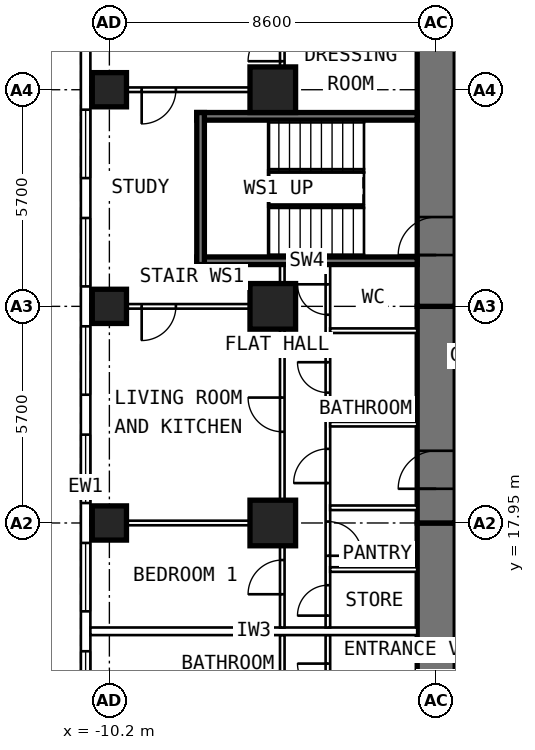
"""IFC4 building model, lengths in metres.
Left out: names, types, materials, properties, quantities, classifications, styles, units other than length and angle.
Written with IfcOpenShell. Run it as: python <this file> out.ifc"""

import sys

from ifc_helpers import new_model, si_unit, direction, frame, frame_2d, origin, origin_2d, place, context, subcontext, project, spatial, rectangle, extrude, element, fill, save


model = new_model("IFC4")
c1 = context("Model", 3, precision=1e-05, world=origin(), true_north=direction((0.0, 1.0)))
c2 = subcontext(c1, "Body", "Model", "MODEL_VIEW")
j1 = project(units=[si_unit("LENGTHUNIT", "METRE"), si_unit("PLANEANGLEUNIT", "RADIAN")], contexts=[c1])
p1 = place(None, origin())
s1 = spatial("IfcSite", under=j1, at=p1, CompositionType="ELEMENT")
p2 = place(p1, origin())
s2 = spatial("IfcBuilding", under=s1, at=p2, CompositionType="ELEMENT")
p3 = place(p2, frame((0.0, 0.0, 106.0)))
s3 = spatial("IfcBuildingStorey", under=s2, at=p3, CompositionType="ELEMENT", Elevation=106.0)
for number, where, z_axis, x_axis in (
    (1, (-10.2, 17.95, 0.0), (0.0, 0.0, 1.0), (0.0, 1.0, 0.0)),
    (2, (-10.2, 23.65, 0.0), (0.0, 0.0, 1.0), (0.0, 1.0, 0.0)),
    (3, (-10.2, 29.35, 0.0), (0.0, 0.0, 1.0), (0.0, 1.0, 0.0)),
):
    element("IfcColumn", number, at=place(p3, frame(where, z_axis=z_axis, x_axis=x_axis)), inside=s3, PredefinedType="COLUMN", context=c2, shape_type="SweptSolid", body=[
        extrude(rectangle(XDim=0.9, YDim=0.9, at=origin_2d()), origin(), (0.0, 0.0, 1.0), 3.6),
    ])
for number, where, z_axis, x_axis in (
    (4, (-5.9, 17.95, 0.0), (0.0, 0.0, 1.0), (0.0, 1.0, 0.0)),
    (5, (-5.9, 23.65, 0.0), (0.0, 0.0, 1.0), (0.0, 1.0, 0.0)),
    (6, (-5.9, 29.35, 0.0), (0.0, 0.0, 1.0), (0.0, 1.0, 0.0)),
):
    element("IfcColumn", number, at=place(p3, frame(where, z_axis=z_axis, x_axis=x_axis)), inside=s3, PredefinedType="COLUMN", context=c2, shape_type="SweptSolid", body=[
        extrude(rectangle(XDim=1.2, YDim=1.2, at=origin_2d()), origin(), (0.0, 0.0, 1.0), 3.6),
    ])
p4 = place(p3, frame((-1.6, 9.6, 0.0), z_axis=(0.0, 0.0, 1.0), x_axis=(0.0, 1.0, 0.0)))
e7 = element("IfcWall", 7, at=p4, inside=s3, PredefinedType="SHEAR", context=c2, shape_type="SweptSolid", body=[
    extrude(rectangle(XDim=8.35, YDim=1.0, at=frame_2d((4.175, 0.0))), origin(), (0.0, 0.0, 1.0), 3.6),
])
p5 = place(p4, frame((1.3, 0.0, 0.0)))
e8 = element("IfcOpeningElement", 8, at=p5, cuts=e7, PredefinedType="OPENING", context=c2, shape_type="SweptSolid", body=[
    extrude(rectangle(XDim=1.0, YDim=2.1, at=frame_2d((0.5, 1.05))), frame((0.0, 0.512, 0.0), z_axis=(0.0, -1.0, 0.0), x_axis=(1.0, 0.0, 0.0)), (0.0, 0.0, 1.0), 1.024),
])
p6 = place(p3, frame((-1.6, 17.95, 0.0), z_axis=(0.0, 0.0, 1.0), x_axis=(0.0, 1.0, 0.0)))
e9 = element("IfcWall", 9, at=p6, inside=s3, PredefinedType="SHEAR", context=c2, shape_type="SweptSolid", body=[
    extrude(rectangle(XDim=5.7, YDim=1.0, at=frame_2d((2.85, 0.0))), origin(), (0.0, 0.0, 1.0), 3.6),
])
p7 = place(p6, frame((0.9, 0.0, 0.0)))
e10 = element("IfcOpeningElement", 10, at=p7, cuts=e9, PredefinedType="OPENING", context=c2, shape_type="SweptSolid", body=[
    extrude(rectangle(XDim=1.0, YDim=2.1, at=frame_2d((0.5, 1.05))), frame((0.0, 0.512, 0.0), z_axis=(0.0, -1.0, 0.0), x_axis=(1.0, 0.0, 0.0)), (0.0, 0.0, 1.0), 1.024),
])
p8 = place(p3, frame((-1.6, 23.65, 0.0), z_axis=(0.0, 0.0, 1.0), x_axis=(0.0, 1.0, 0.0)))
e11 = element("IfcWall", 11, at=p8, inside=s3, PredefinedType="SHEAR", context=c2, shape_type="SweptSolid", body=[
    extrude(rectangle(XDim=10.745, YDim=1.0, at=frame_2d((5.373, 0.0))), origin(), (0.0, 0.0, 1.0), 3.6),
])
p9 = place(p8, frame((1.35, 0.0, 0.0)))
e12 = element("IfcOpeningElement", 12, at=p9, cuts=e11, PredefinedType="OPENING", context=c2, shape_type="SweptSolid", body=[
    extrude(rectangle(XDim=1.0, YDim=2.1, at=frame_2d((0.5, 1.05))), frame((0.0, 0.512, 0.0), z_axis=(0.0, -1.0, 0.0), x_axis=(1.0, 0.0, 0.0)), (0.0, 0.0, 1.0), 1.024),
])
p10 = place(p3, frame((-10.825, 6.148, 0.0), z_axis=(0.0, 0.0, 1.0), x_axis=(0.0, 1.0, 0.0)))
e13 = element("IfcWall", 13, at=p10, inside=s3, PredefinedType="SOLIDWALL", context=c2, shape_type="SweptSolid", body=[
    extrude(rectangle(XDim=25.487, YDim=0.25, at=frame_2d((12.744, 0.0))), origin(), (0.0, 0.0, 1.0), 3.35),
])
p11 = place(p10, frame((0.927, 0.0, 0.8)))
e14 = element("IfcOpeningElement", 14, at=p11, cuts=e13, PredefinedType="OPENING", context=c2, shape_type="SweptSolid", body=[
    extrude(rectangle(XDim=1.8, YDim=1.8, at=frame_2d((0.9, 0.9))), frame((0.0, 0.137, 0.0), z_axis=(0.0, -1.0, 0.0), x_axis=(1.0, 0.0, 0.0)), (0.0, 0.0, 1.0), 0.274),
])
p12 = place(p10, frame((3.777, 0.0, 0.8)))
e15 = element("IfcOpeningElement", 15, at=p12, cuts=e13, PredefinedType="OPENING", context=c2, shape_type="SweptSolid", body=[
    extrude(rectangle(XDim=1.8, YDim=1.8, at=frame_2d((0.9, 0.9))), frame((0.0, 0.137, 0.0), z_axis=(0.0, -1.0, 0.0), x_axis=(1.0, 0.0, 0.0)), (0.0, 0.0, 1.0), 0.274),
])
p13 = place(p10, frame((6.627, 0.0, 0.8)))
e16 = element("IfcOpeningElement", 16, at=p13, cuts=e13, PredefinedType="OPENING", context=c2, shape_type="SweptSolid", body=[
    extrude(rectangle(XDim=1.8, YDim=1.8, at=frame_2d((0.9, 0.9))), frame((0.0, 0.137, 0.0), z_axis=(0.0, -1.0, 0.0), x_axis=(1.0, 0.0, 0.0)), (0.0, 0.0, 1.0), 0.274),
])
p14 = place(p10, frame((9.477, 0.0, 0.8)))
e17 = element("IfcOpeningElement", 17, at=p14, cuts=e13, PredefinedType="OPENING", context=c2, shape_type="SweptSolid", body=[
    extrude(rectangle(XDim=1.8, YDim=1.8, at=frame_2d((0.9, 0.9))), frame((0.0, 0.137, 0.0), z_axis=(0.0, -1.0, 0.0), x_axis=(1.0, 0.0, 0.0)), (0.0, 0.0, 1.0), 0.274),
])
p15 = place(p10, frame((12.327, 0.0, 0.8)))
e18 = element("IfcOpeningElement", 18, at=p15, cuts=e13, PredefinedType="OPENING", context=c2, shape_type="SweptSolid", body=[
    extrude(rectangle(XDim=1.8, YDim=1.8, at=frame_2d((0.9, 0.9))), frame((0.0, 0.137, 0.0), z_axis=(0.0, -1.0, 0.0), x_axis=(1.0, 0.0, 0.0)), (0.0, 0.0, 1.0), 0.274),
])
p16 = place(p10, frame((15.177, 0.0, 0.8)))
e19 = element("IfcOpeningElement", 19, at=p16, cuts=e13, PredefinedType="OPENING", context=c2, shape_type="SweptSolid", body=[
    extrude(rectangle(XDim=1.8, YDim=1.8, at=frame_2d((0.9, 0.9))), frame((0.0, 0.137, 0.0), z_axis=(0.0, -1.0, 0.0), x_axis=(1.0, 0.0, 0.0)), (0.0, 0.0, 1.0), 0.274),
])
p17 = place(p10, frame((18.027, 0.0, 0.8)))
e20 = element("IfcOpeningElement", 20, at=p17, cuts=e13, PredefinedType="OPENING", context=c2, shape_type="SweptSolid", body=[
    extrude(rectangle(XDim=1.8, YDim=1.8, at=frame_2d((0.9, 0.9))), frame((0.0, 0.137, 0.0), z_axis=(0.0, -1.0, 0.0), x_axis=(1.0, 0.0, 0.0)), (0.0, 0.0, 1.0), 0.274),
])
p18 = place(p10, frame((20.877, 0.0, 0.8)))
e21 = element("IfcOpeningElement", 21, at=p18, cuts=e13, PredefinedType="OPENING", context=c2, shape_type="SweptSolid", body=[
    extrude(rectangle(XDim=1.8, YDim=1.8, at=frame_2d((0.9, 0.9))), frame((0.0, 0.137, 0.0), z_axis=(0.0, -1.0, 0.0), x_axis=(1.0, 0.0, 0.0)), (0.0, 0.0, 1.0), 0.274),
])
p19 = place(p3, frame((-4.45, 10.1, 0.0), z_axis=(0.0, 0.0, 1.0), x_axis=(0.0, 1.0, 0.0)))
e22 = element("IfcWall", 22, at=p19, inside=s3, PredefinedType="PARTITIONING", context=c2, shape_type="SweptSolid", body=[
    extrude(rectangle(XDim=4.9, YDim=0.12, at=frame_2d((2.45, 0.0))), origin(), (0.0, 0.0, 1.0), 3.35),
])
p20 = place(p19, frame((0.75, 0.0, 0.0)))
e23 = element("IfcOpeningElement", 23, at=p20, cuts=e22, PredefinedType="OPENING", context=c2, shape_type="SweptSolid", body=[
    extrude(rectangle(XDim=0.9, YDim=2.1, at=frame_2d((0.45, 1.05))), frame((0.0, 0.072, 0.0), z_axis=(0.0, -1.0, 0.0), x_axis=(1.0, 0.0, 0.0)), (0.0, 0.0, 1.0), 0.144),
])
p21 = place(p19, frame((3.35, 0.0, 0.0)))
e24 = element("IfcOpeningElement", 24, at=p21, cuts=e22, PredefinedType="OPENING", context=c2, shape_type="SweptSolid", body=[
    extrude(rectangle(XDim=0.8, YDim=2.1, at=frame_2d((0.4, 1.05))), frame((0.0, 0.072, 0.0), z_axis=(0.0, -1.0, 0.0), x_axis=(1.0, 0.0, 0.0)), (0.0, 0.0, 1.0), 0.144),
])
p22 = place(p3, frame((-5.65, 9.6, 0.0), z_axis=(0.0, 0.0, 1.0), x_axis=(0.0, 1.0, 0.0)))
e25 = element("IfcWall", 25, at=p22, inside=s3, PredefinedType="PARTITIONING", context=c2, shape_type="SweptSolid", body=[
    extrude(rectangle(XDim=5.4, YDim=0.12, at=frame_2d((2.7, 0.0))), origin(), (0.0, 0.0, 1.0), 3.35),
])
p23 = place(p22, frame((3.4, 0.0, 0.0)))
e26 = element("IfcOpeningElement", 26, at=p23, cuts=e25, PredefinedType="OPENING", context=c2, shape_type="SweptSolid", body=[
    extrude(rectangle(XDim=0.9, YDim=2.1, at=frame_2d((0.45, 1.05))), frame((0.0, 0.072, 0.0), z_axis=(0.0, -1.0, 0.0), x_axis=(1.0, 0.0, 0.0)), (0.0, 0.0, 1.0), 0.144),
])
p24 = place(p3, frame((-4.45, 15.2, 0.0), z_axis=(0.0, 0.0, 1.0), x_axis=(0.0, 1.0, 0.0)))
e27 = element("IfcWall", 27, at=p24, inside=s3, PredefinedType="PARTITIONING", context=c2, shape_type="SweptSolid", body=[
    extrude(rectangle(XDim=9.55, YDim=0.12, at=frame_2d((4.775, 0.0))), origin(), (0.0, 0.0, 1.0), 3.35),
])
p25 = place(p24, frame((0.312, 0.0, 0.0)))
e28 = element("IfcOpeningElement", 28, at=p25, cuts=e27, PredefinedType="OPENING", context=c2, shape_type="SweptSolid", body=[
    extrude(rectangle(XDim=0.8, YDim=2.1, at=frame_2d((0.4, 1.05))), frame((0.0, 0.072, 0.0), z_axis=(0.0, -1.0, 0.0), x_axis=(1.0, 0.0, 0.0)), (0.0, 0.0, 1.0), 0.144),
])
p26 = place(p24, frame((1.887, 0.0, 0.0)))
e29 = element("IfcOpeningElement", 29, at=p26, cuts=e27, PredefinedType="OPENING", context=c2, shape_type="SweptSolid", body=[
    extrude(rectangle(XDim=0.9, YDim=2.1, at=frame_2d((0.45, 1.05))), frame((0.0, 0.072, 0.0), z_axis=(0.0, -1.0, 0.0), x_axis=(1.0, 0.0, 0.0)), (0.0, 0.0, 1.0), 0.144),
])
p27 = place(p24, frame((3.8, 0.0, 0.0)))
e30 = element("IfcOpeningElement", 30, at=p27, cuts=e27, PredefinedType="OPENING", context=c2, shape_type="SweptSolid", body=[
    extrude(rectangle(XDim=0.9, YDim=2.1, at=frame_2d((0.45, 1.05))), frame((0.0, 0.072, 0.0), z_axis=(0.0, -1.0, 0.0), x_axis=(1.0, 0.0, 0.0)), (0.0, 0.0, 1.0), 0.144),
])
p28 = place(p24, frame((6.18, 0.0, 0.0)))
e31 = element("IfcOpeningElement", 31, at=p28, cuts=e27, PredefinedType="OPENING", context=c2, shape_type="SweptSolid", body=[
    extrude(rectangle(XDim=0.8, YDim=2.1, at=frame_2d((0.4, 1.05))), frame((0.0, 0.072, 0.0), z_axis=(0.0, -1.0, 0.0), x_axis=(1.0, 0.0, 0.0)), (0.0, 0.0, 1.0), 0.144),
])
p29 = place(p24, frame((8.23, 0.0, 0.0)))
e32 = element("IfcOpeningElement", 32, at=p29, cuts=e27, PredefinedType="OPENING", context=c2, shape_type="SweptSolid", body=[
    extrude(rectangle(XDim=0.8, YDim=2.1, at=frame_2d((0.4, 1.05))), frame((0.0, 0.072, 0.0), z_axis=(0.0, -1.0, 0.0), x_axis=(1.0, 0.0, 0.0)), (0.0, 0.0, 1.0), 0.144),
])
p30 = place(p3, frame((-5.65, 15.2, 0.0), z_axis=(0.0, 0.0, 1.0), x_axis=(0.0, 1.0, 0.0)))
e33 = element("IfcWall", 33, at=p30, inside=s3, PredefinedType="PARTITIONING", context=c2, shape_type="SweptSolid", body=[
    extrude(rectangle(XDim=9.55, YDim=0.12, at=frame_2d((4.775, 0.0))), origin(), (0.0, 0.0, 1.0), 3.35),
])
p31 = place(p30, frame((0.875, 0.0, 0.0)))
e34 = element("IfcOpeningElement", 34, at=p31, cuts=e33, PredefinedType="OPENING", context=c2, shape_type="SweptSolid", body=[
    extrude(rectangle(XDim=0.9, YDim=2.1, at=frame_2d((0.45, 1.05))), frame((0.0, 0.072, 0.0), z_axis=(0.0, -1.0, 0.0), x_axis=(1.0, 0.0, 0.0)), (0.0, 0.0, 1.0), 0.144),
])
p32 = place(p30, frame((5.15, 0.0, 0.0)))
e35 = element("IfcOpeningElement", 35, at=p32, cuts=e33, PredefinedType="OPENING", context=c2, shape_type="SweptSolid", body=[
    extrude(rectangle(XDim=0.9, YDim=2.1, at=frame_2d((0.45, 1.05))), frame((0.0, 0.072, 0.0), z_axis=(0.0, -1.0, 0.0), x_axis=(1.0, 0.0, 0.0)), (0.0, 0.0, 1.0), 0.144),
])
p33 = place(p3, frame((-5.71, 17.95, 0.0), z_axis=(0.0, 0.0, 1.0), x_axis=(-1.0, 0.0, 0.0)))
e36 = element("IfcWall", 36, at=p33, inside=s3, PredefinedType="PARTITIONING", context=c2, shape_type="SweptSolid", body=[
    extrude(rectangle(XDim=4.99, YDim=0.12, at=frame_2d((2.495, 0.0))), origin(), (0.0, 0.0, 1.0), 2.45),
])
for number, where, z_axis, x_axis in (
    (37, (-2.1, 16.725, 0.0), (0.0, 0.0, 1.0), (-1.0, 0.0, 0.0)),
    (38, (-2.1, 18.35, 0.0), (0.0, 0.0, 1.0), (-1.0, 0.0, 0.0)),
    (39, (-2.1, 20.55, 0.0), (0.0, 0.0, 1.0), (-1.0, 0.0, 0.0)),
    (40, (-2.1, 23.01, 0.0), (0.0, 0.0, 1.0), (-1.0, 0.0, 0.0)),
):
    element("IfcWall", number, at=place(p3, frame(where, z_axis=z_axis, x_axis=x_axis)), inside=s3, PredefinedType="PARTITIONING", context=c2, shape_type="SweptSolid", body=[
        extrude(rectangle(XDim=2.29, YDim=0.12, at=frame_2d((1.145, 0.0))), origin(), (0.0, 0.0, 1.0), 3.35),
    ])
p34 = place(p3, frame((-2.1, 15.1, 0.0), z_axis=(0.0, 0.0, 1.0), x_axis=(-1.0, 0.0, 0.0)))
e41 = element("IfcWall", 41, at=p34, inside=s3, PredefinedType="PARTITIONING", context=c2, shape_type="SweptSolid", body=[
    extrude(rectangle(XDim=8.6, YDim=0.2, at=frame_2d((4.3, 0.0))), origin(), (0.0, 0.0, 1.0), 3.35),
])
p35 = place(p3, frame((-5.71, 23.65, 0.0), z_axis=(0.0, 0.0, 1.0), x_axis=(-1.0, 0.0, 0.0)))
e42 = element("IfcWall", 42, at=p35, inside=s3, PredefinedType="PARTITIONING", context=c2, shape_type="SweptSolid", body=[
    extrude(rectangle(XDim=4.99, YDim=0.12, at=frame_2d((2.495, 0.0))), origin(), (0.0, 0.0, 1.0), 2.45),
])
p36 = place(p35, frame((2.74, 0.0, 0.0)))
e43 = element("IfcOpeningElement", 43, at=p36, cuts=e42, PredefinedType="OPENING", context=c2, shape_type="SweptSolid", body=[
    extrude(rectangle(XDim=0.9, YDim=2.1, at=frame_2d((0.45, 1.05))), frame((0.0, 0.072, 0.0), z_axis=(0.0, -1.0, 0.0), x_axis=(1.0, 0.0, 0.0)), (0.0, 0.0, 1.0), 0.144),
])
p37 = place(p3, frame((-5.71, 29.35, 0.0), z_axis=(0.0, 0.0, 1.0), x_axis=(-1.0, 0.0, 0.0)))
e44 = element("IfcWall", 44, at=p37, inside=s3, PredefinedType="PARTITIONING", context=c2, shape_type="SweptSolid", body=[
    extrude(rectangle(XDim=4.99, YDim=0.12, at=frame_2d((2.495, 0.0))), origin(), (0.0, 0.0, 1.0), 2.45),
])
p38 = place(p37, frame((2.74, 0.0, 0.0)))
e45 = element("IfcOpeningElement", 45, at=p38, cuts=e44, PredefinedType="OPENING", context=c2, shape_type="SweptSolid", body=[
    extrude(rectangle(XDim=0.9, YDim=2.1, at=frame_2d((0.45, 1.05))), frame((0.0, 0.072, 0.0), z_axis=(0.0, -1.0, 0.0), x_axis=(1.0, 0.0, 0.0)), (0.0, 0.0, 1.0), 0.144),
])
p39 = place(p3, frame((-5.65, 28.95, 0.0), z_axis=(0.0, 0.0, 1.0), x_axis=(0.0, 1.0, 0.0)))
e46 = element("IfcWall", 46, at=p39, inside=s3, PredefinedType="PARTITIONING", context=c2, shape_type="SweptSolid", body=[
    extrude(rectangle(XDim=5.445, YDim=0.12, at=frame_2d((2.723, 0.0))), origin(), (0.0, 0.0, 1.0), 3.35),
])
p40 = place(p39, frame((1.15, 0.0, 0.0)))
e47 = element("IfcOpeningElement", 47, at=p40, cuts=e46, PredefinedType="OPENING", context=c2, shape_type="SweptSolid", body=[
    extrude(rectangle(XDim=0.9, YDim=2.1, at=frame_2d((0.45, 1.05))), frame((0.0, 0.072, 0.0), z_axis=(0.0, -1.0, 0.0), x_axis=(1.0, 0.0, 0.0)), (0.0, 0.0, 1.0), 0.144),
])
for number, where, z_axis, x_axis in (
    (48, (-2.1, 24.85, 0.0), (0.0, 0.0, 1.0), (-1.0, 0.0, 0.0)),
    (49, (-2.1, 28.65, 0.0), (0.0, 0.0, 1.0), (-1.0, 0.0, 0.0)),
):
    element("IfcWall", number, at=place(p3, frame(where, z_axis=z_axis, x_axis=x_axis)), inside=s3, PredefinedType="SHEAR", context=c2, shape_type="SweptSolid", body=[
        extrude(rectangle(XDim=5.8, YDim=0.2, at=frame_2d((2.9, 0.0))), origin(), (0.0, 0.0, 1.0), 3.33),
    ])
p41 = place(p3, frame((-7.8, 24.75, 0.0), z_axis=(0.0, 0.0, 1.0), x_axis=(0.0, 1.0, 0.0)))
e50 = element("IfcWall", 50, at=p41, inside=s3, PredefinedType="SHEAR", context=c2, shape_type="SweptSolid", body=[
    extrude(rectangle(XDim=4.0, YDim=0.2, at=frame_2d((2.0, 0.0))), origin(), (0.0, 0.0, 1.0), 3.33),
])
p42 = place(p13, origin())
e51 = element("IfcWindow", 51, at=p42, inside=s3, PartitioningType="SINGLE_PANEL", PredefinedType="WINDOW", context=c2, shape_type="SweptSolid", body=[
    extrude(rectangle(XDim=1.8, YDim=1.8, at=frame_2d((0.9, 0.9))), frame((0.0, 0.03, 0.0), z_axis=(0.0, -1.0, 0.0), x_axis=(1.0, 0.0, 0.0)), (0.0, 0.0, 1.0), 0.06),
])
fill(e16, e51)
p43 = place(p14, origin())
e52 = element("IfcWindow", 52, at=p43, inside=s3, PartitioningType="SINGLE_PANEL", PredefinedType="WINDOW", context=c2, shape_type="SweptSolid", body=[
    extrude(rectangle(XDim=1.8, YDim=1.8, at=frame_2d((0.9, 0.9))), frame((0.0, 0.03, 0.0), z_axis=(0.0, -1.0, 0.0), x_axis=(1.0, 0.0, 0.0)), (0.0, 0.0, 1.0), 0.06),
])
fill(e17, e52)
p44 = place(p15, origin())
e53 = element("IfcWindow", 53, at=p44, inside=s3, PartitioningType="SINGLE_PANEL", PredefinedType="WINDOW", context=c2, shape_type="SweptSolid", body=[
    extrude(rectangle(XDim=1.8, YDim=1.8, at=frame_2d((0.9, 0.9))), frame((0.0, 0.03, 0.0), z_axis=(0.0, -1.0, 0.0), x_axis=(1.0, 0.0, 0.0)), (0.0, 0.0, 1.0), 0.06),
])
fill(e18, e53)
p45 = place(p16, origin())
e54 = element("IfcWindow", 54, at=p45, inside=s3, PartitioningType="SINGLE_PANEL", PredefinedType="WINDOW", context=c2, shape_type="SweptSolid", body=[
    extrude(rectangle(XDim=1.8, YDim=1.8, at=frame_2d((0.9, 0.9))), frame((0.0, 0.03, 0.0), z_axis=(0.0, -1.0, 0.0), x_axis=(1.0, 0.0, 0.0)), (0.0, 0.0, 1.0), 0.06),
])
fill(e19, e54)
p46 = place(p17, origin())
e55 = element("IfcWindow", 55, at=p46, inside=s3, PartitioningType="SINGLE_PANEL", PredefinedType="WINDOW", context=c2, shape_type="SweptSolid", body=[
    extrude(rectangle(XDim=1.8, YDim=1.8, at=frame_2d((0.9, 0.9))), frame((0.0, 0.03, 0.0), z_axis=(0.0, -1.0, 0.0), x_axis=(1.0, 0.0, 0.0)), (0.0, 0.0, 1.0), 0.06),
])
fill(e20, e55)
p47 = place(p18, origin())
e56 = element("IfcWindow", 56, at=p47, inside=s3, PartitioningType="SINGLE_PANEL", PredefinedType="WINDOW", context=c2, shape_type="SweptSolid", body=[
    extrude(rectangle(XDim=1.8, YDim=1.8, at=frame_2d((0.9, 0.9))), frame((0.0, 0.03, 0.0), z_axis=(0.0, -1.0, 0.0), x_axis=(1.0, 0.0, 0.0)), (0.0, 0.0, 1.0), 0.06),
])
fill(e21, e56)
p48 = place(p21, origin())
e57 = element("IfcDoor", 57, at=p48, inside=s3, OperationType="SINGLE_SWING_RIGHT", PredefinedType="DOOR", context=c2, shape_type="SweptSolid", body=[
    extrude(rectangle(XDim=0.8, YDim=2.1, at=frame_2d((0.4, 1.05))), frame((0.0, 0.025, 0.0), z_axis=(0.0, -1.0, 0.0), x_axis=(1.0, 0.0, 0.0)), (0.0, 0.0, 1.0), 0.05),
])
fill(e24, e57)
p49 = place(p7, origin())
e58 = element("IfcDoor", 58, at=p49, inside=s3, OperationType="SINGLE_SWING_LEFT", PredefinedType="DOOR", context=c2, shape_type="SweptSolid", body=[
    extrude(rectangle(XDim=1.0, YDim=2.1, at=frame_2d((0.5, 1.05))), frame((0.0, 0.25, 0.0), z_axis=(0.0, -1.0, 0.0), x_axis=(1.0, 0.0, 0.0)), (0.0, 0.0, 1.0), 0.5),
])
fill(e10, e58)
p50 = place(p31, origin())
e59 = element("IfcDoor", 59, at=p50, inside=s3, OperationType="SINGLE_SWING_LEFT", PredefinedType="DOOR", context=c2, shape_type="SweptSolid", body=[
    extrude(rectangle(XDim=0.9, YDim=2.1, at=frame_2d((0.45, 1.05))), frame((0.0, 0.025, 0.0), z_axis=(0.0, -1.0, 0.0), x_axis=(1.0, 0.0, 0.0)), (0.0, 0.0, 1.0), 0.05),
])
fill(e34, e59)
p51 = place(p32, origin())
e60 = element("IfcDoor", 60, at=p51, inside=s3, OperationType="SINGLE_SWING_RIGHT", PredefinedType="DOOR", context=c2, shape_type="SweptSolid", body=[
    extrude(rectangle(XDim=0.9, YDim=2.1, at=frame_2d((0.45, 1.05))), frame((0.0, 0.025, 0.0), z_axis=(0.0, -1.0, 0.0), x_axis=(1.0, 0.0, 0.0)), (0.0, 0.0, 1.0), 0.05),
])
fill(e35, e60)
p52 = place(p25, origin())
e61 = element("IfcDoor", 61, at=p52, inside=s3, OperationType="SINGLE_SWING_LEFT", PredefinedType="DOOR", context=c2, shape_type="SweptSolid", body=[
    extrude(rectangle(XDim=0.8, YDim=2.1, at=frame_2d((0.4, 1.05))), frame((0.0, 0.025, 0.0), z_axis=(0.0, -1.0, 0.0), x_axis=(1.0, 0.0, 0.0)), (0.0, 0.0, 1.0), 0.05),
])
fill(e28, e61)
p53 = place(p26, frame((0.9, 0.0, 0.0), z_axis=(0.0, 0.0, 1.0), x_axis=(-1.0, 0.0, 0.0)))
e62 = element("IfcDoor", 62, at=p53, inside=s3, OperationType="SINGLE_SWING_RIGHT", PredefinedType="DOOR", context=c2, shape_type="SweptSolid", body=[
    extrude(rectangle(XDim=0.9, YDim=2.1, at=frame_2d((0.45, 1.05))), frame((0.0, 0.025, 0.0), z_axis=(0.0, -1.0, 0.0), x_axis=(1.0, 0.0, 0.0)), (0.0, 0.0, 1.0), 0.05),
])
fill(e29, e62)
p54 = place(p27, origin())
e63 = element("IfcDoor", 63, at=p54, inside=s3, OperationType="SINGLE_SWING_LEFT", PredefinedType="DOOR", context=c2, shape_type="SweptSolid", body=[
    extrude(rectangle(XDim=0.9, YDim=2.1, at=frame_2d((0.45, 1.05))), frame((0.0, 0.025, 0.0), z_axis=(0.0, -1.0, 0.0), x_axis=(1.0, 0.0, 0.0)), (0.0, 0.0, 1.0), 0.05),
])
fill(e30, e63)
p55 = place(p28, origin())
e64 = element("IfcDoor", 64, at=p55, inside=s3, OperationType="SINGLE_SWING_RIGHT", PredefinedType="DOOR", context=c2, shape_type="SweptSolid", body=[
    extrude(rectangle(XDim=0.8, YDim=2.1, at=frame_2d((0.4, 1.05))), frame((0.0, 0.025, 0.0), z_axis=(0.0, -1.0, 0.0), x_axis=(1.0, 0.0, 0.0)), (0.0, 0.0, 1.0), 0.05),
])
fill(e31, e64)
p56 = place(p29, origin())
e65 = element("IfcDoor", 65, at=p56, inside=s3, OperationType="SINGLE_SWING_RIGHT", PredefinedType="DOOR", context=c2, shape_type="SweptSolid", body=[
    extrude(rectangle(XDim=0.8, YDim=2.1, at=frame_2d((0.4, 1.05))), frame((0.0, 0.025, 0.0), z_axis=(0.0, -1.0, 0.0), x_axis=(1.0, 0.0, 0.0)), (0.0, 0.0, 1.0), 0.05),
])
fill(e32, e65)
p57 = place(p38, origin())
e66 = element("IfcDoor", 66, at=p57, inside=s3, OperationType="SINGLE_SWING_RIGHT", PredefinedType="DOOR", context=c2, shape_type="SweptSolid", body=[
    extrude(rectangle(XDim=0.9, YDim=2.1, at=frame_2d((0.45, 1.05))), frame((0.0, 0.025, 0.0), z_axis=(0.0, -1.0, 0.0), x_axis=(1.0, 0.0, 0.0)), (0.0, 0.0, 1.0), 0.05),
])
fill(e45, e66)
p58 = place(p40, origin())
e67 = element("IfcDoor", 67, at=p58, inside=s3, OperationType="SINGLE_SWING_LEFT", PredefinedType="DOOR", context=c2, shape_type="SweptSolid", body=[
    extrude(rectangle(XDim=0.9, YDim=2.1, at=frame_2d((0.45, 1.05))), frame((0.0, 0.025, 0.0), z_axis=(0.0, -1.0, 0.0), x_axis=(1.0, 0.0, 0.0)), (0.0, 0.0, 1.0), 0.05),
])
fill(e47, e67)
p59 = place(p36, origin())
e68 = element("IfcDoor", 68, at=p59, inside=s3, OperationType="SINGLE_SWING_RIGHT", PredefinedType="DOOR", context=c2, shape_type="SweptSolid", body=[
    extrude(rectangle(XDim=0.9, YDim=2.1, at=frame_2d((0.45, 1.05))), frame((0.0, 0.025, 0.0), z_axis=(0.0, -1.0, 0.0), x_axis=(1.0, 0.0, 0.0)), (0.0, 0.0, 1.0), 0.05),
])
fill(e43, e68)
p60 = place(p9, origin())
e69 = element("IfcDoor", 69, at=p60, inside=s3, OperationType="SINGLE_SWING_LEFT", PredefinedType="DOOR", context=c2, shape_type="SweptSolid", body=[
    extrude(rectangle(XDim=1.0, YDim=2.1, at=frame_2d((0.5, 1.05))), frame((0.0, 0.25, 0.0), z_axis=(0.0, -1.0, 0.0), x_axis=(1.0, 0.0, 0.0)), (0.0, 0.0, 1.0), 0.5),
])
fill(e12, e69)
save(model, sys.argv[1])
